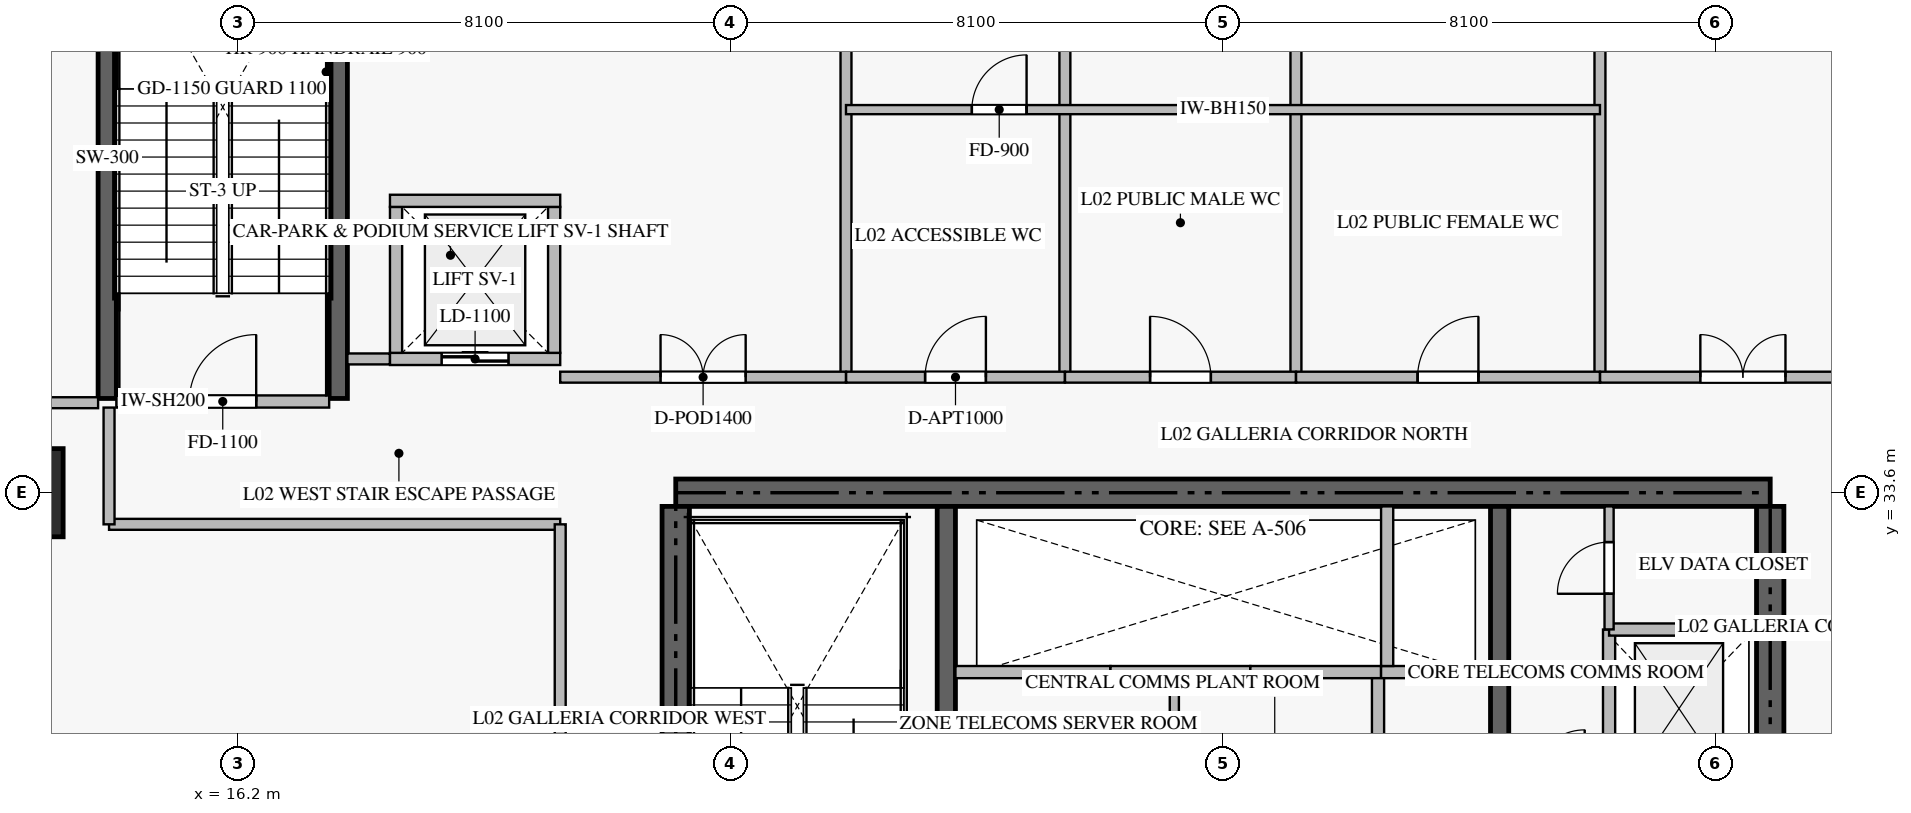
"""IFC4 building model, lengths in metres.
Left out: names, types, materials, properties, quantities, classifications, styles, units other than length and angle.
Written with IfcOpenShell. Run it as: python <this file> out.ifc"""

import sys

from ifc_helpers import new_model, si_unit, direction, frame, frame_2d, origin, origin_2d, place, context, subcontext, project, spatial, rectangle, extrude, source, transform, mapped, element, fill, save


model = new_model("IFC4")
c1 = context("Model", 3, precision=1e-05, world=origin(), true_north=direction((0.0, 1.0)))
c2 = subcontext(c1, "Body", "Model", "MODEL_VIEW")
j1 = project(units=[si_unit("LENGTHUNIT", "METRE"), si_unit("PLANEANGLEUNIT", "RADIAN")], contexts=[c1])
p1 = place(None, origin())
s1 = spatial("IfcSite", under=j1, at=p1, CompositionType="ELEMENT")
p2 = place(p1, origin())
s2 = spatial("IfcBuilding", under=s1, at=p2, CompositionType="ELEMENT")
p3 = place(p2, frame((0.0, 0.0, 10.5)))
s3 = spatial("IfcBuildingStorey", under=s2, at=p3, CompositionType="ELEMENT", Elevation=10.5)
p4 = place(p3, frame((41.4, 33.6, -0.38), z_axis=(0.0, 0.0, 1.0), x_axis=(-1.0, 0.0, 0.0)))
e1 = element("IfcWall", 1, at=p4, inside=s3, PredefinedType="SHEAR", context=c2, shape_type="SweptSolid", body=[
    extrude(rectangle(XDim=18.0, YDim=0.45, at=frame_2d((9.0, 0.0))), origin(), (0.0, 0.0, 1.0), 4.798),
])
p5 = place(p3, frame((23.4, 24.25, -0.38), z_axis=(0.0, 0.0, 1.0), x_axis=(0.0, 1.0, 0.0)))
e2 = element("IfcWall", 2, at=p5, inside=s3, PredefinedType="SHEAR", context=c2, shape_type="SweptSolid", body=[
    extrude(rectangle(XDim=9.125, YDim=0.45, at=frame_2d((4.562, 0.0))), origin(), (0.0, 0.0, 1.0), 4.798),
])
p6 = place(p3, frame((41.4, 27.75, -0.38), z_axis=(0.0, 0.0, 1.0), x_axis=(0.0, 1.0, 0.0)))
e3 = element("IfcWall", 3, at=p6, inside=s3, PredefinedType="SHEAR", context=c2, shape_type="SweptSolid", body=[
    extrude(rectangle(XDim=5.625, YDim=0.45, at=frame_2d((2.812, 0.0))), origin(), (0.0, 0.0, 1.0), 4.798),
])
p7 = place(p3, frame((27.85, 23.55, -0.38), z_axis=(0.0, 0.0, 1.0), x_axis=(0.0, 1.0, 0.0)))
e4 = element("IfcWall", 4, at=p7, inside=s3, PredefinedType="SHEAR", context=c2, shape_type="SweptSolid", body=[
    extrude(rectangle(XDim=9.825, YDim=0.3, at=frame_2d((4.913, 0.0))), origin(), (0.0, 0.0, 1.0), 4.798),
])
p8 = place(p3, frame((36.95, 27.05, -0.38), z_axis=(0.0, 0.0, 1.0), x_axis=(0.0, 1.0, 0.0)))
e5 = element("IfcWall", 5, at=p8, inside=s3, PredefinedType="SHEAR", context=c2, shape_type="SweptSolid", body=[
    extrude(rectangle(XDim=6.325, YDim=0.3, at=frame_2d((3.163, 0.0))), origin(), (0.0, 0.0, 1.0), 4.798),
])
m1 = source(origin(), c2, "Body", "SweptSolid", [
    extrude(rectangle(XDim=1.45, YDim=1.45, at=origin_2d()), origin(), (0.0, 0.0, 1.0), 4.8),
])
p9 = place(p3, frame((12.6, 33.6, -0.38), z_axis=(0.0, 0.0, 1.0), x_axis=(1.0, 0.0, 0.0)))
e6 = element("IfcColumn", 6, at=p9, inside=s3, PredefinedType="COLUMN", context=c2, shape_type="MappedRepresentation", body=[
    mapped(m1, transform((0.0, 0.0, 0.0), scale=1.0)),
])
for number, where, z_axis, x_axis in (
    (7, (14.05, 35.15, -0.38), (0.0, 0.0, 1.0), (0.0, 1.0, 0.0)),
    (8, (17.85, 35.15, -0.38), (0.0, 0.0, 1.0), (0.0, 1.0, 0.0)),
):
    element("IfcWall", number, at=place(p3, frame(where, z_axis=z_axis, x_axis=x_axis)), inside=s3, PredefinedType="SHEAR", context=c2, shape_type="SweptSolid", body=[
        extrude(rectangle(XDim=7.9, YDim=0.3, at=frame_2d((3.95, 0.0))), origin(), (0.0, 0.0, 1.0), 4.798),
    ])
p10 = place(p3, frame((14.2, 35.1, 0.0), z_axis=(0.0, 0.0, 1.0), x_axis=(1.0, 0.0, 0.0)))
e9 = element("IfcWall", 9, at=p10, inside=s3, PredefinedType="STANDARD", context=c2, shape_type="SweptSolid", body=[
    extrude(rectangle(XDim=3.5, YDim=0.2, at=frame_2d((1.75, 0.0))), origin(), (0.0, 0.0, 1.0), 4.42),
])
p11 = place(p10, frame((1.2, 0.0, 0.0)))
e10 = element("IfcOpeningElement", 10, at=p11, cuts=e9, PredefinedType="OPENING", context=c2, shape_type="SweptSolid", body=[
    extrude(rectangle(XDim=1.1, YDim=2.15, at=frame_2d((0.55, 1.075))), frame((0.0, 0.11, 0.0), z_axis=(0.0, -1.0, 0.0), x_axis=(1.0, 0.0, 0.0)), (0.0, 0.0, 1.0), 0.22),
])
p12 = place(p3, frame((28.0, 30.65, 0.0), z_axis=(0.0, 0.0, 1.0), x_axis=(1.0, 0.0, 0.0)))
e11 = element("IfcWall", 11, at=p12, inside=s3, PredefinedType="STANDARD", context=c2, shape_type="SweptSolid", body=[
    extrude(rectangle(XDim=2.55, YDim=0.2, at=frame_2d((1.275, 0.0))), origin(), (0.0, 0.0, 1.0), 4.42),
])
p13 = place(p3, frame((30.55, 30.65, 0.0), z_axis=(0.0, 0.0, 1.0), x_axis=(1.0, 0.0, 0.0)))
e12 = element("IfcWall", 12, at=p13, inside=s3, PredefinedType="STANDARD", context=c2, shape_type="SweptSolid", body=[
    extrude(rectangle(XDim=2.3, YDim=0.2, at=frame_2d((1.15, 0.0))), origin(), (0.0, 0.0, 1.0), 4.42),
])
p14 = place(p3, frame((32.85, 30.65, 0.0), z_axis=(0.0, 0.0, 1.0), x_axis=(1.0, 0.0, 0.0)))
e13 = element("IfcWall", 13, at=p14, inside=s3, PredefinedType="STANDARD", context=c2, shape_type="SweptSolid", body=[
    extrude(rectangle(XDim=2.15, YDim=0.2, at=frame_2d((1.075, 0.0))), origin(), (0.0, 0.0, 1.0), 4.42),
])
p15 = place(p3, frame((35.0, 30.65, 0.0), z_axis=(0.0, 0.0, 1.0), x_axis=(1.0, 0.0, 0.0)))
e14 = element("IfcWall", 14, at=p15, inside=s3, PredefinedType="STANDARD", context=c2, shape_type="SweptSolid", body=[
    extrude(rectangle(XDim=1.8, YDim=0.2, at=frame_2d((0.9, 0.0))), origin(), (0.0, 0.0, 1.0), 4.42),
])
p16 = place(p3, frame((35.1, 30.75, 0.0), z_axis=(0.0, 0.0, 1.0), x_axis=(0.0, 1.0, 0.0)))
e15 = element("IfcWall", 15, at=p16, inside=s3, PredefinedType="STANDARD", context=c2, shape_type="SweptSolid", body=[
    extrude(rectangle(XDim=2.625, YDim=0.2, at=frame_2d((1.312, 0.0))), origin(), (0.0, 0.0, 1.0), 4.42),
])
p17 = place(p3, frame((18.7, 35.8, 0.0), z_axis=(0.0, 0.0, 1.0), x_axis=(1.0, 0.0, 0.0)))
e16 = element("IfcWall", 16, at=p17, inside=s3, PredefinedType="STANDARD", context=c2, shape_type="SweptSolid", body=[
    extrude(rectangle(XDim=2.8, YDim=0.2, at=frame_2d((1.4, 0.0))), origin(), (0.0, 0.0, 1.0), 4.42),
])
p18 = place(p17, frame((0.85, 0.0, 0.0)))
e17 = element("IfcOpeningElement", 17, at=p18, cuts=e16, PredefinedType="OPENING", context=c2, shape_type="SweptSolid", body=[
    extrude(rectangle(XDim=1.1, YDim=2.2, at=frame_2d((0.55, 1.1))), frame((0.0, 0.11, 0.0), z_axis=(0.0, -1.0, 0.0), x_axis=(1.0, 0.0, 0.0)), (0.0, 0.0, 1.0), 0.22),
])
for number, where, z_axis, x_axis in (
    (18, (18.8, 35.9, 0.0), (0.0, 0.0, 1.0), (0.0, 1.0, 0.0)),
    (19, (21.4, 35.9, 0.0), (0.0, 0.0, 1.0), (0.0, 1.0, 0.0)),
):
    element("IfcWall", number, at=place(p3, frame(where, z_axis=z_axis, x_axis=x_axis)), inside=s3, PredefinedType="STANDARD", context=c2, shape_type="SweptSolid", body=[
        extrude(rectangle(XDim=2.4, YDim=0.2, at=frame_2d((1.2, 0.0))), origin(), (0.0, 0.0, 1.0), 4.42),
    ])
p19 = place(p3, frame((18.7, 38.4, 0.0), z_axis=(0.0, 0.0, 1.0), x_axis=(1.0, 0.0, 0.0)))
e20 = element("IfcWall", 20, at=p19, inside=s3, PredefinedType="STANDARD", context=c2, shape_type="SweptSolid", body=[
    extrude(rectangle(XDim=2.8, YDim=0.2, at=frame_2d((1.4, 0.0))), origin(), (0.0, 0.0, 1.0), 4.42),
])
p20 = place(p3, frame((38.75, 28.85, 0.0), z_axis=(0.0, 0.0, 1.0), x_axis=(0.0, 1.0, 0.0)))
e21 = element("IfcWall", 21, at=p20, inside=s3, PredefinedType="STANDARD", context=c2, shape_type="SweptSolid", body=[
    extrude(rectangle(XDim=2.5, YDim=0.2, at=frame_2d((1.25, 0.0))), origin(), (0.0, 0.0, 1.0), 4.42),
])
p21 = place(p3, frame((38.75, 31.35, 0.0), z_axis=(0.0, 0.0, 1.0), x_axis=(1.0, 0.0, 0.0)))
e22 = element("IfcWall", 22, at=p21, inside=s3, PredefinedType="STANDARD", context=c2, shape_type="SweptSolid", body=[
    extrude(rectangle(XDim=2.425, YDim=0.2, at=frame_2d((1.212, 0.0))), origin(), (0.0, 0.0, 1.0), 4.42),
])
p22 = place(p3, frame((38.75, 31.352, 0.0), z_axis=(0.0, 0.0, 1.0), x_axis=(0.0, 1.0, 0.0)))
e23 = element("IfcWall", 23, at=p22, inside=s3, PredefinedType="PARTITIONING", context=c2, shape_type="SweptSolid", body=[
    extrude(rectangle(XDim=2.023, YDim=0.15, at=frame_2d((1.011, 0.0))), origin(), (0.0, 0.0, 1.0), 4.42),
])
p23 = place(p22, frame((0.586, 0.0, 0.0)))
e24 = element("IfcOpeningElement", 24, at=p23, cuts=e23, PredefinedType="OPENING", context=c2, shape_type="SweptSolid", body=[
    extrude(rectangle(XDim=0.85, YDim=2.1, at=frame_2d((0.425, 1.05))), frame((0.0, 0.085, 0.0), z_axis=(0.0, -1.0, 0.0), x_axis=(1.0, 0.0, 0.0)), (0.0, 0.0, 1.0), 0.17),
])
p24 = place(p3, frame((34.95, 26.95, 0.0), z_axis=(0.0, 0.0, 1.0), x_axis=(0.0, 1.0, 0.0)))
e25 = element("IfcWall", 25, at=p24, inside=s3, PredefinedType="STANDARD", context=c2, shape_type="SweptSolid", body=[
    extrude(rectangle(XDim=3.6, YDim=0.2, at=frame_2d((1.8, 0.0))), origin(), (0.0, 0.0, 1.0), 4.42),
])
p25 = place(p24, frame((1.35, 0.0, 0.0)))
e26 = element("IfcOpeningElement", 26, at=p25, cuts=e25, PredefinedType="OPENING", context=c2, shape_type="SweptSolid", body=[
    extrude(rectangle(XDim=0.9, YDim=2.1, at=frame_2d((0.45, 1.05))), frame((0.0, 0.11, 0.0), z_axis=(0.0, -1.0, 0.0), x_axis=(1.0, 0.0, 0.0)), (0.0, 0.0, 1.0), 0.22),
])
p26 = place(p3, frame((31.6, 26.95, 0.0), z_axis=(0.0, 0.0, 1.0), x_axis=(0.0, 1.0, 0.0)))
e27 = element("IfcWall", 27, at=p26, inside=s3, PredefinedType="PARTITIONING", context=c2, shape_type="SweptSolid", body=[
    extrude(rectangle(XDim=3.6, YDim=0.15, at=frame_2d((1.8, 0.0))), origin(), (0.0, 0.0, 1.0), 4.42),
])
p27 = place(p26, frame((1.375, 0.0, 0.0)))
e28 = element("IfcOpeningElement", 28, at=p27, cuts=e27, PredefinedType="OPENING", context=c2, shape_type="SweptSolid", body=[
    extrude(rectangle(XDim=0.85, YDim=2.1, at=frame_2d((0.425, 1.05))), frame((0.0, 0.085, 0.0), z_axis=(0.0, -1.0, 0.0), x_axis=(1.0, 0.0, 0.0)), (0.0, 0.0, 1.0), 0.17),
])
p28 = place(p3, frame((0.082, 35.08, 0.0), z_axis=(0.0, 0.0, 1.0), x_axis=(1.0, 0.0, 0.0)))
e29 = element("IfcWall", 29, at=p28, inside=s3, PredefinedType="PARTITIONING", context=c2, shape_type="SweptSolid", body=[
    extrude(rectangle(XDim=13.818, YDim=0.18, at=frame_2d((6.909, 0.0))), origin(), (0.0, 0.0, 1.0), 4.42),
])
p29 = place(p3, frame((14.08, 33.08, 0.0), z_axis=(0.0, 0.0, 1.0), x_axis=(1.0, 0.0, 0.0)))
e30 = element("IfcWall", 30, at=p29, inside=s3, PredefinedType="PARTITIONING", context=c2, shape_type="SweptSolid", body=[
    extrude(rectangle(XDim=7.42, YDim=0.18, at=frame_2d((3.71, 0.0))), origin(), (0.0, 0.0, 1.0), 4.42),
])
p30 = place(p3, frame((18.0, 35.8, 0.0), z_axis=(0.0, 0.0, 1.0), x_axis=(1.0, 0.0, 0.0)))
e31 = element("IfcWall", 31, at=p30, inside=s3, PredefinedType="PARTITIONING", context=c2, shape_type="SweptSolid", body=[
    extrude(rectangle(XDim=0.698, YDim=0.18, at=frame_2d((0.349, 0.0))), origin(), (0.0, 0.0, 1.0), 4.42),
])
p31 = place(p3, frame((14.08, 33.08, 0.0), z_axis=(0.0, 0.0, 1.0), x_axis=(0.0, 1.0, 0.0)))
e32 = element("IfcWall", 32, at=p31, inside=s3, PredefinedType="PARTITIONING", context=c2, shape_type="SweptSolid", body=[
    extrude(rectangle(XDim=1.92, YDim=0.18, at=frame_2d((0.96, 0.0))), origin(), (0.0, 0.0, 1.0), 4.42),
])
p32 = place(p3, frame((21.5, 14.9, 0.0), z_axis=(0.0, 0.0, 1.0), x_axis=(0.0, 1.0, 0.0)))
e33 = element("IfcWall", 33, at=p32, inside=s3, PredefinedType="PARTITIONING", context=c2, shape_type="SweptSolid", body=[
    extrude(rectangle(XDim=18.18, YDim=0.18, at=frame_2d((9.09, 0.0))), origin(), (0.0, 0.0, 1.0), 4.42),
])
p33 = place(p32, frame((8.34, 0.0, 0.0)))
e34 = element("IfcOpeningElement", 34, at=p33, cuts=e33, PredefinedType="OPENING", context=c2, shape_type="SweptSolid", body=[
    extrude(rectangle(XDim=1.5, YDim=2.25, at=frame_2d((0.75, 1.125))), frame((0.0, 0.1, 0.0), z_axis=(0.0, -1.0, 0.0), x_axis=(1.0, 0.0, 0.0)), (0.0, 0.0, 1.0), 0.2),
])
for number, where, z_axis, x_axis in (
    (35, (26.2, 35.5, 0.0), (0.0, 0.0, 1.0), (0.0, 1.0, 0.0)),
    (36, (29.8, 35.5, 0.0), (0.0, 0.0, 1.0), (0.0, 1.0, 0.0)),
    (37, (33.6, 35.5, 0.0), (0.0, 0.0, 1.0), (0.0, 1.0, 0.0)),
    (38, (38.6, 35.5, 0.0), (0.0, 0.0, 1.0), (0.0, 1.0, 0.0)),
):
    element("IfcWall", number, at=place(p3, frame(where, z_axis=z_axis, x_axis=x_axis)), inside=s3, PredefinedType="PARTITIONING", context=c2, shape_type="SweptSolid", body=[
        extrude(rectangle(XDim=12.418, YDim=0.18, at=frame_2d((6.209, 0.0))), origin(), (0.0, 0.0, 1.0), 4.42),
    ])
p34 = place(p3, frame((21.5, 35.5, 0.0), z_axis=(0.0, 0.0, 1.0), x_axis=(1.0, 0.0, 0.0)))
e39 = element("IfcWall", 39, at=p34, inside=s3, PredefinedType="PARTITIONING", context=c2, shape_type="SweptSolid", body=[
    extrude(rectangle(XDim=4.7, YDim=0.18, at=frame_2d((2.35, 0.0))), origin(), (0.0, 0.0, 1.0), 4.42),
])
p35 = place(p34, frame((1.65, 0.0, 0.0)))
e40 = element("IfcOpeningElement", 40, at=p35, cuts=e39, PredefinedType="OPENING", context=c2, shape_type="SweptSolid", body=[
    extrude(rectangle(XDim=1.4, YDim=2.25, at=frame_2d((0.7, 1.125))), frame((0.0, 0.1, 0.0), z_axis=(0.0, -1.0, 0.0), x_axis=(1.0, 0.0, 0.0)), (0.0, 0.0, 1.0), 0.2),
])
p36 = place(p3, frame((26.202, 35.5, 0.0), z_axis=(0.0, 0.0, 1.0), x_axis=(1.0, 0.0, 0.0)))
e41 = element("IfcWall", 41, at=p36, inside=s3, PredefinedType="PARTITIONING", context=c2, shape_type="SweptSolid", body=[
    extrude(rectangle(XDim=3.598, YDim=0.18, at=frame_2d((1.799, 0.0))), origin(), (0.0, 0.0, 1.0), 4.42),
])
p37 = place(p36, frame((1.299, 0.0, 0.0)))
e42 = element("IfcOpeningElement", 42, at=p37, cuts=e41, PredefinedType="OPENING", context=c2, shape_type="SweptSolid", body=[
    extrude(rectangle(XDim=1.0, YDim=2.15, at=frame_2d((0.5, 1.075))), frame((0.0, 0.1, 0.0), z_axis=(0.0, -1.0, 0.0), x_axis=(1.0, 0.0, 0.0)), (0.0, 0.0, 1.0), 0.2),
])
p38 = place(p3, frame((29.802, 35.5, 0.0), z_axis=(0.0, 0.0, 1.0), x_axis=(1.0, 0.0, 0.0)))
e43 = element("IfcWall", 43, at=p38, inside=s3, PredefinedType="PARTITIONING", context=c2, shape_type="SweptSolid", body=[
    extrude(rectangle(XDim=3.798, YDim=0.18, at=frame_2d((1.899, 0.0))), origin(), (0.0, 0.0, 1.0), 4.42),
])
p39 = place(p38, frame((1.399, 0.0, 0.0)))
e44 = element("IfcOpeningElement", 44, at=p39, cuts=e43, PredefinedType="OPENING", context=c2, shape_type="SweptSolid", body=[
    extrude(rectangle(XDim=1.0, YDim=2.15, at=frame_2d((0.5, 1.075))), frame((0.0, 0.1, 0.0), z_axis=(0.0, -1.0, 0.0), x_axis=(1.0, 0.0, 0.0)), (0.0, 0.0, 1.0), 0.2),
])
p40 = place(p3, frame((33.602, 35.5, 0.0), z_axis=(0.0, 0.0, 1.0), x_axis=(1.0, 0.0, 0.0)))
e45 = element("IfcWall", 45, at=p40, inside=s3, PredefinedType="PARTITIONING", context=c2, shape_type="SweptSolid", body=[
    extrude(rectangle(XDim=4.998, YDim=0.18, at=frame_2d((2.499, 0.0))), origin(), (0.0, 0.0, 1.0), 4.42),
])
p41 = place(p40, frame((1.999, 0.0, 0.0)))
e46 = element("IfcOpeningElement", 46, at=p41, cuts=e45, PredefinedType="OPENING", context=c2, shape_type="SweptSolid", body=[
    extrude(rectangle(XDim=1.0, YDim=2.15, at=frame_2d((0.5, 1.075))), frame((0.0, 0.1, 0.0), z_axis=(0.0, -1.0, 0.0), x_axis=(1.0, 0.0, 0.0)), (0.0, 0.0, 1.0), 0.2),
])
p42 = place(p3, frame((38.602, 35.5, 0.0), z_axis=(0.0, 0.0, 1.0), x_axis=(1.0, 0.0, 0.0)))
e47 = element("IfcWall", 47, at=p42, inside=s3, PredefinedType="PARTITIONING", context=c2, shape_type="SweptSolid", body=[
    extrude(rectangle(XDim=4.698, YDim=0.18, at=frame_2d((2.349, 0.0))), origin(), (0.0, 0.0, 1.0), 4.42),
])
p43 = place(p42, frame((1.649, 0.0, 0.0)))
e48 = element("IfcOpeningElement", 48, at=p43, cuts=e47, PredefinedType="OPENING", context=c2, shape_type="SweptSolid", body=[
    extrude(rectangle(XDim=1.4, YDim=2.25, at=frame_2d((0.7, 1.125))), frame((0.0, 0.1, 0.0), z_axis=(0.0, -1.0, 0.0), x_axis=(1.0, 0.0, 0.0)), (0.0, 0.0, 1.0), 0.2),
])
p44 = place(p3, frame((26.2, 39.9, 0.0), z_axis=(0.0, 0.0, 1.0), x_axis=(1.0, 0.0, 0.0)))
e49 = element("IfcWall", 49, at=p44, inside=s3, PredefinedType="PARTITIONING", context=c2, shape_type="SweptSolid", body=[
    extrude(rectangle(XDim=12.4, YDim=0.15, at=frame_2d((6.2, 0.0))), origin(), (0.0, 0.0, 1.0), 4.42),
])
p45 = place(p44, frame((2.07, 0.0, 0.0)))
e50 = element("IfcOpeningElement", 50, at=p45, cuts=e49, PredefinedType="OPENING", context=c2, shape_type="SweptSolid", body=[
    extrude(rectangle(XDim=0.9, YDim=2.1, at=frame_2d((0.45, 1.05))), frame((0.0, 0.085, 0.0), z_axis=(0.0, -1.0, 0.0), x_axis=(1.0, 0.0, 0.0)), (0.0, 0.0, 1.0), 0.17),
])
m2 = source(origin(), c2, "Body", "SweptSolid", [
    extrude(rectangle(XDim=1.1, YDim=2.15, at=frame_2d((0.55, 1.075))), frame((0.0, 0.025, 0.0), z_axis=(0.0, -1.0, 0.0), x_axis=(1.0, 0.0, 0.0)), (0.0, 0.0, 1.0), 0.05),
])
p46 = place(p11, origin())
e51 = element("IfcDoor", 51, at=p46, inside=s3, OperationType="SINGLE_SWING_RIGHT", PredefinedType="DOOR", context=c2, shape_type="MappedRepresentation", body=[
    mapped(m2, transform((0.0, 0.0, 0.0), scale=1.0)),
])
fill(e10, e51)
m3 = source(origin(), c2, "Body", "SweptSolid", [
    extrude(rectangle(XDim=1.1, YDim=2.2, at=frame_2d((0.55, 1.1))), frame((0.0, 0.025, 0.0), z_axis=(0.0, -1.0, 0.0), x_axis=(1.0, 0.0, 0.0)), (0.0, 0.0, 1.0), 0.05),
])
p47 = place(p18, origin())
e52 = element("IfcDoor", 52, at=p47, inside=s3, OperationType="DOUBLE_DOOR_SLIDING", PredefinedType="DOOR", context=c2, shape_type="MappedRepresentation", body=[
    mapped(m3, transform((0.0, 0.0, 0.0), scale=1.0)),
])
fill(e17, e52)
m4 = source(origin(), c2, "Body", "SweptSolid", [
    extrude(rectangle(XDim=0.85, YDim=2.1, at=frame_2d((0.425, 1.05))), frame((0.0, 0.025, 0.0), z_axis=(0.0, -1.0, 0.0), x_axis=(1.0, 0.0, 0.0)), (0.0, 0.0, 1.0), 0.05),
])
p48 = place(p23, origin())
e53 = element("IfcDoor", 53, at=p48, inside=s3, OperationType="SINGLE_SWING_LEFT", PredefinedType="DOOR", context=c2, shape_type="MappedRepresentation", body=[
    mapped(m4, transform((0.0, 0.0, 0.0), scale=1.0)),
])
fill(e24, e53)
m5 = source(origin(), c2, "Body", "SweptSolid", [
    extrude(rectangle(XDim=1.4, YDim=2.25, at=frame_2d((0.7, 1.125))), frame((0.0, 0.025, 0.0), z_axis=(0.0, -1.0, 0.0), x_axis=(1.0, 0.0, 0.0)), (0.0, 0.0, 1.0), 0.05),
])
p49 = place(p35, origin())
e54 = element("IfcDoor", 54, at=p49, inside=s3, OperationType="DOUBLE_DOOR_SINGLE_SWING", PredefinedType="DOOR", context=c2, shape_type="MappedRepresentation", body=[
    mapped(m5, transform((0.0, 0.0, 0.0), scale=1.0)),
])
fill(e40, e54)
m6 = source(origin(), c2, "Body", "SweptSolid", [
    extrude(rectangle(XDim=1.0, YDim=2.15, at=frame_2d((0.5, 1.075))), frame((0.0, 0.025, 0.0), z_axis=(0.0, -1.0, 0.0), x_axis=(1.0, 0.0, 0.0)), (0.0, 0.0, 1.0), 0.05),
])
p50 = place(p37, origin())
e55 = element("IfcDoor", 55, at=p50, inside=s3, OperationType="SINGLE_SWING_RIGHT", PredefinedType="DOOR", context=c2, shape_type="MappedRepresentation", body=[
    mapped(m6, transform((0.0, 0.0, 0.0), scale=1.0)),
])
fill(e42, e55)
p51 = place(p39, origin())
e56 = element("IfcDoor", 56, at=p51, inside=s3, OperationType="SINGLE_SWING_LEFT", PredefinedType="DOOR", context=c2, shape_type="MappedRepresentation", body=[
    mapped(m6, transform((0.0, 0.0, 0.0), scale=1.0)),
])
fill(e44, e56)
p52 = place(p41, origin())
e57 = element("IfcDoor", 57, at=p52, inside=s3, OperationType="SINGLE_SWING_RIGHT", PredefinedType="DOOR", context=c2, shape_type="MappedRepresentation", body=[
    mapped(m6, transform((0.0, 0.0, 0.0), scale=1.0)),
])
fill(e46, e57)
p53 = place(p43, origin())
e58 = element("IfcDoor", 58, at=p53, inside=s3, OperationType="DOUBLE_DOOR_SINGLE_SWING", PredefinedType="DOOR", context=c2, shape_type="MappedRepresentation", body=[
    mapped(m5, transform((0.0, 0.0, 0.0), scale=1.0)),
])
fill(e48, e58)
m7 = source(origin(), c2, "Body", "SweptSolid", [
    extrude(rectangle(XDim=0.9, YDim=2.1, at=frame_2d((0.45, 1.05))), frame((0.0, 0.025, 0.0), z_axis=(0.0, -1.0, 0.0), x_axis=(1.0, 0.0, 0.0)), (0.0, 0.0, 1.0), 0.05),
])
p54 = place(p45, origin())
e59 = element("IfcDoor", 59, at=p54, inside=s3, OperationType="SINGLE_SWING_RIGHT", PredefinedType="DOOR", context=c2, shape_type="MappedRepresentation", body=[
    mapped(m7, transform((0.0, 0.0, 0.0), scale=1.0)),
])
fill(e50, e59)
save(model, sys.argv[1])
